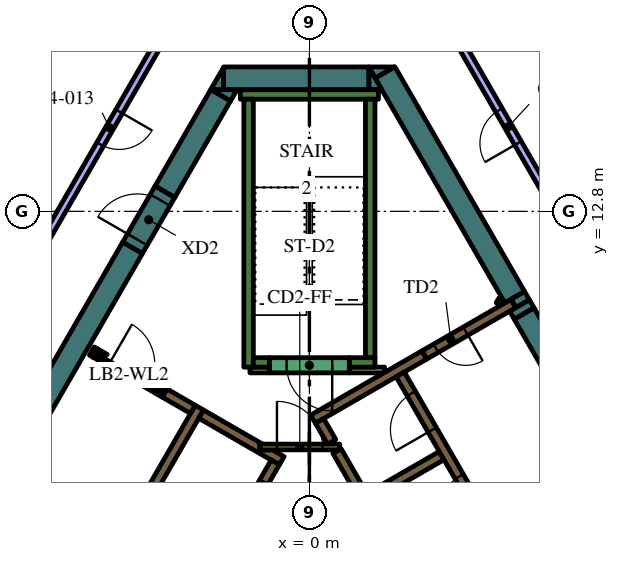
"""IFC4 building model, lengths in metres.
Left out: names, types, materials, properties, quantities, classifications, styles, units other than length and angle.
Written with IfcOpenShell. Run it as: python <this file> out.ifc"""

import sys

from ifc_helpers import new_model, si_unit, direction, frame, frame_2d, origin, place, context, subcontext, project, spatial, polyline, rectangle, outline, extrude, element, fill, save


model = new_model("IFC4")
c1 = context("Model", 3, precision=1e-05, world=origin(), true_north=direction((0.0, 1.0)))
c2 = subcontext(c1, "Body", "Model", "MODEL_VIEW")
j1 = project(units=[si_unit("LENGTHUNIT", "METRE"), si_unit("PLANEANGLEUNIT", "RADIAN")], contexts=[c1])
p1 = place(None, origin())
s1 = spatial("IfcSite", under=j1, at=p1, CompositionType="ELEMENT")
p2 = place(p1, origin())
s2 = spatial("IfcBuilding", under=s1, at=p2, CompositionType="ELEMENT")
p3 = place(p2, frame((0.0, 0.0, 304.8)))
s3 = spatial("IfcBuildingStorey", under=s2, at=p3, CompositionType="ELEMENT", Elevation=304.8)
p4 = place(p3, frame((5.529, 10.324, 0.0), z_axis=(0.0, 0.0, 1.0), x_axis=(0.499122205112, -0.866531606097, 0.0)))
e1 = element("IfcWall", 1, at=p4, inside=s3, PredefinedType="SOLIDWALL", context=c2, shape_type="SweptSolid", body=[
    extrude(rectangle(XDim=0.247, YDim=0.6, at=frame_2d((0.123, 0.0))), origin(), (0.0, 0.0, 1.0), 4.2),
])
p5 = place(p3, frame((1.989, 16.456, 0.0), z_axis=(0.0, 0.0, 1.0), x_axis=(0.499973159588, -0.866040899549, 0.0)))
e2 = element("IfcWall", 2, at=p5, inside=s3, PredefinedType="SOLIDWALL", context=c2, shape_type="SweptSolid", body=[
    extrude(rectangle(XDim=6.828, YDim=0.6, at=frame_2d((3.414, 0.0))), origin(), (0.0, 0.0, 1.0), 4.2),
])
p6 = place(p3, origin())
e3 = element("IfcWall", 3, at=p6, inside=s3, PredefinedType="SOLIDWALL", context=c2, shape_type="SweptSolid", body=[
    extrude(outline(polyline([(5.664, 10.691), (5.788, 10.476), (5.432, 10.271), (5.308, 10.486), (5.664, 10.691)])), origin(), (0.0, 0.0, 1.0), 4.2),
])
e4 = element("IfcWall", 4, at=p6, inside=s3, PredefinedType="SOLIDWALL", context=c2, shape_type="SweptSolid", body=[
    extrude(outline(polyline([(1.559, 16.6), (2.235, 16.6), (1.728, 16.307), (1.559, 16.6)])), origin(), (0.0, 0.0, 1.0), 4.2),
])
p7 = place(p3, frame((8.192, 5.711, 0.0), z_axis=(0.0, 0.0, 1.0), x_axis=(-0.500006836656, 0.866021456604, 0.0)))
e5 = element("IfcWall", 5, at=p7, inside=s3, PredefinedType="SOLIDWALL", context=c2, shape_type="SweptSolid", body=[
    extrude(rectangle(XDim=5.078, YDim=0.6, at=frame_2d((2.539, 0.0))), origin(), (0.0, 0.0, 1.0), 4.2),
])
p8 = place(p3, frame((-2.258, 16.3, 0.0), z_axis=(0.0, 0.0, 1.0), x_axis=(1.0, 0.0, 0.0)))
e6 = element("IfcWall", 6, at=p8, inside=s3, PredefinedType="SOLIDWALL", context=c2, shape_type="SweptSolid", body=[
    extrude(rectangle(XDim=3.823, YDim=0.6, at=frame_2d((1.912, 0.0))), origin(), (0.0, 0.0, 1.0), 4.2),
])
e7 = element("IfcWall", 7, at=p6, inside=s3, PredefinedType="SOLIDWALL", context=c2, shape_type="SweptSolid", body=[
    extrude(outline(polyline([(1.905, 16.0), (1.567, 16.0), (1.567, 16.585), (1.905, 16.0)])), origin(), (0.0, 0.0, 1.0), 4.2),
])
e8 = element("IfcWall", 8, at=p6, inside=s3, PredefinedType="SOLIDWALL", context=c2, shape_type="SweptSolid", body=[
    extrude(outline(polyline([(-2.598, 16.0), (-2.26, 16.585), (-2.26, 16.0), (-2.598, 16.0)])), origin(), (0.0, 0.0, 1.0), 4.2),
])
p9 = place(p3, frame((-2.335, 15.855, 0.0), z_axis=(0.0, 0.0, 1.0), x_axis=(-0.499960127962, -0.866048422692, 0.0)))
e9 = element("IfcWall", 9, at=p9, inside=s3, PredefinedType="SOLIDWALL", context=c2, shape_type="SweptSolid", body=[
    extrude(rectangle(XDim=2.934, YDim=0.6, at=frame_2d((1.467, 0.0))), origin(), (0.0, 0.0, 1.0), 4.2),
])
e10 = element("IfcWall", 10, at=p6, inside=s3, PredefinedType="SOLIDWALL", context=c2, shape_type="SweptSolid", body=[
    extrude(outline(polyline([(-1.905, 16.0), (-2.074, 15.707), (-2.581, 16.0), (-1.905, 16.0)])), origin(), (0.0, 0.0, 1.0), 4.2),
])
p10 = place(p3, frame((-12.582, -1.892, 0.0), z_axis=(0.0, 0.0, 1.0), x_axis=(0.500003640647, 0.866023301845, 0.0)))
e11 = element("IfcWall", 11, at=p10, inside=s3, PredefinedType="SOLIDWALL", context=c2, shape_type="SweptSolid", body=[
    extrude(rectangle(XDim=15.858, YDim=0.6, at=frame_2d((7.929, 0.0))), origin(), (0.0, 0.0, 1.0), 4.2),
])
p11 = place(p3, frame((-1.817, 15.875, 0.0), z_axis=(0.0, 0.0, 1.0), x_axis=(1.0, 0.0, 0.0)))
e12 = element("IfcWall", 12, at=p11, inside=s3, PredefinedType="SOLIDWALL", context=c2, shape_type="SweptSolid", body=[
    extrude(rectangle(XDim=3.634, YDim=0.25, at=frame_2d((1.817, 0.0))), origin(), (0.0, 0.0, 1.0), 4.2),
])
p12 = place(p3, frame((1.6, 8.95, 0.0), z_axis=(0.0, 0.0, 1.0), x_axis=(0.0, 1.0, 0.0)))
e13 = element("IfcWall", 13, at=p12, inside=s3, PredefinedType="SOLIDWALL", context=c2, shape_type="SweptSolid", body=[
    extrude(rectangle(XDim=6.8, YDim=0.25, at=frame_2d((3.4, 0.0))), origin(), (0.0, 0.0, 1.0), 4.2),
])
p13 = place(p3, frame((1.05, 8.825, 0.0), z_axis=(0.0, 0.0, 1.0), x_axis=(1.0, 0.0, 0.0)))
e14 = element("IfcWall", 14, at=p13, inside=s3, PredefinedType="SOLIDWALL", context=c2, shape_type="SweptSolid", body=[
    extrude(rectangle(XDim=0.675, YDim=0.25, at=frame_2d((0.337, 0.0))), origin(), (0.0, 0.0, 1.0), 4.2),
])
p14 = place(p3, frame((-1.6, 8.7, 0.0), z_axis=(0.0, 0.0, 1.0), x_axis=(0.0, 1.0, 0.0)))
e15 = element("IfcWall", 15, at=p14, inside=s3, PredefinedType="SOLIDWALL", context=c2, shape_type="SweptSolid", body=[
    extrude(rectangle(XDim=7.05, YDim=0.25, at=frame_2d((3.525, 0.0))), origin(), (0.0, 0.0, 1.0), 4.2),
])
p15 = place(p3, frame((-1.475, 8.825, 0.0), z_axis=(0.0, 0.0, 1.0), x_axis=(1.0, 0.0, 0.0)))
e16 = element("IfcWall", 16, at=p15, inside=s3, PredefinedType="SOLIDWALL", context=c2, shape_type="SweptSolid", body=[
    extrude(rectangle(XDim=0.425, YDim=0.25, at=frame_2d((0.212, 0.0))), origin(), (0.0, 0.0, 1.0), 4.2),
])
p16 = place(p3, frame((3.028, 9.023, 0.0), z_axis=(0.0, 0.0, 1.0), x_axis=(-0.866036587186, -0.49998062928, 0.0)))
e17 = element("IfcWall", 17, at=p16, inside=s3, PredefinedType="SOLIDWALL", context=c2, shape_type="SweptSolid", body=[
    extrude(rectangle(XDim=3.384, YDim=0.25, at=frame_2d((1.692, 0.0))), origin(), (0.0, 0.0, 1.0), 4.2),
])
p17 = place(p3, frame((0.268, 7.285, 0.0), z_axis=(0.0, 0.0, 1.0), x_axis=(0.500098681536, -0.865968422476, 0.0)))
e18 = element("IfcWall", 18, at=p17, inside=s3, PredefinedType="SOLIDWALL", context=c2, shape_type="SweptSolid", body=[
    extrude(rectangle(XDim=0.636, YDim=0.25, at=frame_2d((0.318, 0.0))), origin(), (0.0, 0.0, 1.0), 4.2),
])
p18 = place(p3, frame((5.97, -2.591, 0.0), z_axis=(0.0, 0.0, 1.0), x_axis=(-0.499994469932, 0.866028596547, 0.0)))
e19 = element("IfcWall", 19, at=p18, inside=s3, PredefinedType="SOLIDWALL", context=c2, shape_type="SweptSolid", body=[
    extrude(rectangle(XDim=10.488, YDim=0.25, at=frame_2d((5.244, 0.0))), origin(), (0.0, 0.0, 1.0), 4.2),
])
p19 = place(p3, frame((1.574, 5.274, 0.0), z_axis=(0.0, 0.0, 1.0), x_axis=(0.866028486751, 0.499994660107, 0.0)))
e20 = element("IfcWall", 20, at=p19, inside=s3, PredefinedType="SOLIDWALL", context=c2, shape_type="SweptSolid", body=[
    extrude(rectangle(XDim=2.2, YDim=0.25, at=frame_2d((1.1, 0.0))), origin(), (0.0, 0.0, 1.0), 4.2),
])
p20 = place(p3, frame((-8.06, -1.311, 0.0), z_axis=(0.0, 0.0, 1.0), x_axis=(0.50000273126, 0.866023826885, 0.0)))
e21 = element("IfcWall", 21, at=p20, inside=s3, PredefinedType="SOLIDWALL", context=c2, shape_type="SweptSolid", body=[
    extrude(rectangle(XDim=10.33, YDim=0.25, at=frame_2d((5.165, 0.0))), origin(), (0.0, 0.0, 1.0), 4.2),
])
e22 = element("IfcWall", 22, at=p6, inside=s3, PredefinedType="SOLIDWALL", context=c2, shape_type="SweptSolid", body=[
    extrude(outline(polyline([(-2.912, 7.356), (-2.787, 7.573), (-1.232, 6.675), (-1.303, 6.675), (-1.304, 6.675), (-1.304, 6.675), (-1.304, 6.525), (-1.304, 6.525), (-1.303, 6.525), (-0.971, 6.525), (-0.665, 6.348), (-0.79, 6.132), (-1.007, 6.257), (-1.007, 6.257), (-2.912, 7.356)])), origin(), (0.0, 0.0, 1.0), 4.2),
])
p21 = place(p3, frame((-5.725, 9.125, 0.0), z_axis=(0.0, 0.0, 1.0), x_axis=(0.866185586049, -0.49972245349, 0.0)))
e23 = element("IfcWall", 23, at=p21, inside=s3, PredefinedType="SOLIDWALL", context=c2, shape_type="SweptSolid", body=[
    extrude(rectangle(XDim=0.11, YDim=0.25, at=frame_2d((0.055, 0.0))), origin(), (0.0, 0.0, 1.0), 4.2),
])
p22 = place(p3, frame((-3.066, 7.59, 0.0), z_axis=(0.0, 0.0, 1.0), x_axis=(-0.866081358704, 0.49990307071, 0.0)))
e24 = element("IfcWall", 24, at=p22, inside=s3, PredefinedType="SOLIDWALL", context=c2, shape_type="SweptSolid", body=[
    extrude(rectangle(XDim=0.858, YDim=0.25, at=frame_2d((0.429, 0.0))), origin(), (0.0, 0.0, 1.0), 4.2),
])
e25 = element("IfcWall", 25, at=p6, inside=s3, PredefinedType="SOLIDWALL", context=c2, shape_type="SweptSolid", body=[
    extrude(outline(polyline([(-3.748, 8.128), (-3.813, 8.015), (-4.027, 8.139), (-4.017, 8.156), (-4.008, 8.173), (-4.0, 8.192), (-3.995, 8.21), (-3.991, 8.23), (-3.99, 8.25), (-3.99, 8.268), (-3.748, 8.128)])), origin(), (0.0, 0.0, 1.0), 4.2),
])
e26 = element("IfcWall", 26, at=p6, inside=s3, PredefinedType="SOLIDWALL", context=c2, shape_type="SweptSolid", body=[
    extrude(outline(polyline([(-5.689, 8.96), (-5.69, 8.961), (-5.565, 9.177), (-5.319, 9.035), (-5.335, 9.026), (-5.351, 9.015), (-5.366, 9.002), (-5.379, 8.988), (-5.392, 8.972), (-5.402, 8.956), (-5.412, 8.939), (-5.629, 9.064), (-5.629, 9.064), (-5.689, 8.96)])), origin(), (0.0, 0.0, 1.0), 4.2),
])
p23 = place(p3, frame((1.05, 8.625, 0.0), z_axis=(0.0, 0.0, 1.0), x_axis=(1.0, 0.0, 0.0)))
e27 = element("IfcWall", 27, at=p23, inside=s3, PredefinedType="PARTITIONING", context=c2, shape_type="SweptSolid", body=[
    extrude(rectangle(XDim=0.929, YDim=0.15, at=frame_2d((0.464, 0.0))), origin(), (0.0, 0.0, 1.0), 3.55),
])
p24 = place(p3, frame((-1.564, 8.625, 0.0), z_axis=(0.0, 0.0, 1.0), x_axis=(1.0, 0.0, 0.0)))
e28 = element("IfcWall", 28, at=p24, inside=s3, PredefinedType="PARTITIONING", context=c2, shape_type="SweptSolid", body=[
    extrude(rectangle(XDim=0.514, YDim=0.15, at=frame_2d((0.257, 0.0))), origin(), (0.0, 0.0, 1.0), 3.55),
])
p25 = place(p3, frame((4.98, 10.358, 0.0), z_axis=(0.0, 0.0, 1.0), x_axis=(0.500640202437, 0.86565546709, 0.0)))
e29 = element("IfcWall", 29, at=p25, inside=s3, PredefinedType="PARTITIONING", context=c2, shape_type="SweptSolid", body=[
    extrude(rectangle(XDim=0.146, YDim=0.15, at=frame_2d((0.073, 0.0))), origin(), (0.0, 0.0, 1.0), 3.55),
])
p26 = place(p3, frame((8.565, -2.185, 0.0), z_axis=(0.0, 0.0, 1.0), x_axis=(-0.499997954832, 0.866026584559, 0.0)))
e30 = element("IfcWall", 30, at=p26, inside=s3, PredefinedType="SOLIDWALL", context=c2, shape_type="SweptSolid", body=[
    extrude(rectangle(XDim=12.35, YDim=0.25, at=frame_2d((6.175, 0.0))), origin(), (0.0, 0.0, 1.0), 4.2),
])
p27 = place(p26, frame((0.685, 0.0, 0.0)))
e31 = element("IfcOpeningElement", 31, at=p27, cuts=e30, PredefinedType="OPENING", context=c2, shape_type="SweptSolid", body=[
    extrude(rectangle(XDim=0.9, YDim=2.1, at=frame_2d((0.45, 1.05))), frame((0.0, 0.135, 0.0), z_axis=(0.0, -1.0, 0.0), x_axis=(1.0, 0.0, 0.0)), (0.0, 0.0, 1.0), 0.27),
])
p28 = place(p26, frame((3.105, 0.0, 0.0)))
e32 = element("IfcOpeningElement", 32, at=p28, cuts=e30, PredefinedType="OPENING", context=c2, shape_type="SweptSolid", body=[
    extrude(rectangle(XDim=1.1, YDim=2.1, at=frame_2d((0.55, 1.05))), frame((0.0, 0.135, 0.0), z_axis=(0.0, -1.0, 0.0), x_axis=(1.0, 0.0, 0.0)), (0.0, 0.0, 1.0), 0.27),
])
p29 = place(p26, frame((5.625, 0.0, 0.0)))
e33 = element("IfcOpeningElement", 33, at=p29, cuts=e30, PredefinedType="OPENING", context=c2, shape_type="SweptSolid", body=[
    extrude(rectangle(XDim=1.1, YDim=2.1, at=frame_2d((0.55, 1.05))), frame((0.0, 0.135, 0.0), z_axis=(0.0, -1.0, 0.0), x_axis=(1.0, 0.0, 0.0)), (0.0, 0.0, 1.0), 0.27),
])
p30 = place(p26, frame((8.145, 0.0, 0.0)))
e34 = element("IfcOpeningElement", 34, at=p30, cuts=e30, PredefinedType="OPENING", context=c2, shape_type="SweptSolid", body=[
    extrude(rectangle(XDim=1.1, YDim=2.1, at=frame_2d((0.55, 1.05))), frame((0.0, 0.135, 0.0), z_axis=(0.0, -1.0, 0.0), x_axis=(1.0, 0.0, 0.0)), (0.0, 0.0, 1.0), 0.27),
])
p31 = place(p26, frame((10.665, 0.0, 0.0)))
e35 = element("IfcOpeningElement", 35, at=p31, cuts=e30, PredefinedType="OPENING", context=c2, shape_type="SweptSolid", body=[
    extrude(rectangle(XDim=1.1, YDim=2.1, at=frame_2d((0.55, 1.05))), frame((0.0, 0.135, 0.0), z_axis=(0.0, -1.0, 0.0), x_axis=(1.0, 0.0, 0.0)), (0.0, 0.0, 1.0), 0.27),
])
p32 = place(p3, frame((-0.898, 6.194, 0.0), z_axis=(0.0, 0.0, 1.0), x_axis=(-0.499996202215, -0.866027596426, 0.0)))
e36 = element("IfcWall", 36, at=p32, inside=s3, PredefinedType="SOLIDWALL", context=c2, shape_type="SweptSolid", body=[
    extrude(rectangle(XDim=9.83, YDim=0.25, at=frame_2d((4.915, 0.0))), origin(), (0.0, 0.0, 1.0), 4.2),
])
p33 = place(p32, frame((0.585, 0.0, 0.0)))
e37 = element("IfcOpeningElement", 37, at=p33, cuts=e36, PredefinedType="OPENING", context=c2, shape_type="SweptSolid", body=[
    extrude(rectangle(XDim=1.1, YDim=2.1, at=frame_2d((0.55, 1.05))), frame((0.0, 0.135, 0.0), z_axis=(0.0, -1.0, 0.0), x_axis=(1.0, 0.0, 0.0)), (0.0, 0.0, 1.0), 0.27),
])
p34 = place(p32, frame((3.105, 0.0, 0.0)))
e38 = element("IfcOpeningElement", 38, at=p34, cuts=e36, PredefinedType="OPENING", context=c2, shape_type="SweptSolid", body=[
    extrude(rectangle(XDim=1.1, YDim=2.1, at=frame_2d((0.55, 1.05))), frame((0.0, 0.135, 0.0), z_axis=(0.0, -1.0, 0.0), x_axis=(1.0, 0.0, 0.0)), (0.0, 0.0, 1.0), 0.27),
])
p35 = place(p32, frame((5.625, 0.0, 0.0)))
e39 = element("IfcOpeningElement", 39, at=p35, cuts=e36, PredefinedType="OPENING", context=c2, shape_type="SweptSolid", body=[
    extrude(rectangle(XDim=1.1, YDim=2.1, at=frame_2d((0.55, 1.05))), frame((0.0, 0.135, 0.0), z_axis=(0.0, -1.0, 0.0), x_axis=(1.0, 0.0, 0.0)), (0.0, 0.0, 1.0), 0.27),
])
p36 = place(p32, frame((8.145, 0.0, 0.0)))
e40 = element("IfcOpeningElement", 40, at=p36, cuts=e36, PredefinedType="OPENING", context=c2, shape_type="SweptSolid", body=[
    extrude(rectangle(XDim=1.1, YDim=2.1, at=frame_2d((0.55, 1.05))), frame((0.0, 0.135, 0.0), z_axis=(0.0, -1.0, 0.0), x_axis=(1.0, 0.0, 0.0)), (0.0, 0.0, 1.0), 0.27),
])
p37 = place(p3, frame((1.05, 8.75, 0.0), z_axis=(0.0, 0.0, 1.0), x_axis=(-1.0, 0.0, 0.0)))
e41 = element("IfcWall", 41, at=p37, inside=s3, PredefinedType="SOLIDWALL", context=c2, shape_type="SweptSolid", body=[
    extrude(rectangle(XDim=2.1, YDim=0.4, at=frame_2d((1.05, 0.0))), origin(), (0.0, 0.0, 1.0), 4.2),
])
p38 = place(p37, frame((0.45, 0.0, 0.0)))
e42 = element("IfcOpeningElement", 42, at=p38, cuts=e41, PredefinedType="OPENING", context=c2, shape_type="SweptSolid", body=[
    extrude(rectangle(XDim=1.2, YDim=2.1, at=frame_2d((0.6, 1.05))), frame((0.0, 0.21, 0.0), z_axis=(0.0, -1.0, 0.0), x_axis=(1.0, 0.0, 0.0)), (0.0, 0.0, 1.0), 0.42),
])
p39 = place(p3, frame((5.366, 10.373, 0.0), z_axis=(0.0, 0.0, 1.0), x_axis=(-0.866019956843, -0.50000943426, 0.0)))
e43 = element("IfcWall", 43, at=p39, inside=s3, PredefinedType="SOLIDWALL", context=c2, shape_type="SweptSolid", body=[
    extrude(rectangle(XDim=2.7, YDim=0.25, at=frame_2d((1.35, 0.0))), origin(), (0.0, 0.0, 1.0), 4.2),
])
p40 = place(p39, frame((1.45, 0.0, 0.0)))
e44 = element("IfcOpeningElement", 44, at=p40, cuts=e43, PredefinedType="OPENING", context=c2, shape_type="SweptSolid", body=[
    extrude(rectangle(XDim=0.9, YDim=2.1, at=frame_2d((0.45, 1.05))), frame((0.0, 0.135, 0.0), z_axis=(0.0, -1.0, 0.0), x_axis=(1.0, 0.0, 0.0)), (0.0, 0.0, 1.0), 0.27),
])
p41 = place(p3, frame((-1.303, 6.6, 0.0), z_axis=(0.0, 0.0, 1.0), x_axis=(1.0, 0.0, 0.0)))
e45 = element("IfcWall", 45, at=p41, inside=s3, PredefinedType="PARTITIONING", context=c2, shape_type="SweptSolid", body=[
    extrude(rectangle(XDim=2.1, YDim=0.15, at=frame_2d((1.05, 0.0))), origin(), (0.0, 0.0, 1.0), 4.2),
])
p42 = place(p41, frame((0.45, 0.0, 0.0)))
e46 = element("IfcOpeningElement", 46, at=p42, cuts=e45, PredefinedType="OPENING", context=c2, shape_type="SweptSolid", body=[
    extrude(rectangle(XDim=1.2, YDim=2.1, at=frame_2d((0.6, 1.05))), frame((0.0, 0.085, 0.0), z_axis=(0.0, -1.0, 0.0), x_axis=(1.0, 0.0, 0.0)), (0.0, 0.0, 1.0), 0.17),
])
p43 = place(p3, frame((-5.659, 9.012, 0.0), z_axis=(0.0, 0.0, 1.0), x_axis=(0.866009402589, -0.500027713859, 0.0)))
e47 = element("IfcWall", 47, at=p43, inside=s3, PredefinedType="PARTITIONING", context=c2, shape_type="SweptSolid", body=[
    extrude(rectangle(XDim=2.1, YDim=0.12, at=frame_2d((1.05, 0.0))), origin(), (0.0, 0.0, 1.0), 3.55),
])
p44 = place(p43, frame((0.45, 0.0, 0.0)))
e48 = element("IfcOpeningElement", 48, at=p44, cuts=e47, PredefinedType="OPENING", context=c2, shape_type="SweptSolid", body=[
    extrude(rectangle(XDim=1.2, YDim=2.1, at=frame_2d((0.6, 1.05))), frame((0.0, 0.07, 0.0), z_axis=(0.0, -1.0, 0.0), x_axis=(1.0, 0.0, 0.0)), (0.0, 0.0, 1.0), 0.14),
])
p45 = place(p3, frame((-4.652, 11.842, 0.0), z_axis=(0.0, 0.0, 1.0), x_axis=(0.500062241894, 0.865989465428, 0.0)))
e49 = element("IfcWall", 49, at=p45, inside=s3, PredefinedType="SOLIDWALL", context=c2, shape_type="SweptSolid", body=[
    extrude(rectangle(XDim=1.7, YDim=0.6, at=frame_2d((0.85, 0.0))), origin(), (0.0, 0.0, 1.0), 4.2),
])
p46 = place(p45, frame((0.25, 0.0, 0.0)))
e50 = element("IfcOpeningElement", 50, at=p46, cuts=e49, PredefinedType="OPENING", context=c2, shape_type="SweptSolid", body=[
    extrude(rectangle(XDim=1.2, YDim=2.1, at=frame_2d((0.6, 1.05))), frame((0.0, 0.31, 0.0), z_axis=(0.0, -1.0, 0.0), x_axis=(1.0, 0.0, 0.0)), (0.0, 0.0, 1.0), 0.62),
])
p47 = place(p3, frame((7.188, 11.65, 0.0), z_axis=(0.0, 0.0, 1.0), x_axis=(-0.499986368499, 0.866033273792, 0.0)))
e51 = element("IfcWall", 51, at=p47, inside=s3, PredefinedType="PARTITIONING", context=c2, shape_type="SweptSolid", body=[
    extrude(rectangle(XDim=7.794, YDim=0.2, at=frame_2d((3.897, 0.0))), origin(), (0.0, 0.0, 1.0), 3.55),
])
p48 = place(p47, frame((3.4, 0.0, 0.0)))
e52 = element("IfcOpeningElement", 52, at=p48, cuts=e51, PredefinedType="OPENING", context=c2, shape_type="SweptSolid", body=[
    extrude(rectangle(XDim=1.0, YDim=2.1, at=frame_2d((0.5, 1.05))), frame((0.0, 0.11, 0.0), z_axis=(0.0, -1.0, 0.0), x_axis=(1.0, 0.0, 0.0)), (0.0, 0.0, 1.0), 0.22),
])
p49 = place(p3, frame((-8.544, 15.69, 0.0), z_axis=(0.0, 0.0, 1.0), x_axis=(0.599538824769, 0.800345673815, 0.0)))
e53 = element("IfcWall", 53, at=p49, inside=s3, PredefinedType="PARTITIONING", context=c2, shape_type="SweptSolid", body=[
    extrude(rectangle(XDim=3.474, YDim=0.15, at=frame_2d((1.737, 0.0))), origin(), (0.0, 0.0, 1.0), 3.55),
])
p50 = place(p49, frame((1.274, 0.0, 0.0)))
e54 = element("IfcOpeningElement", 54, at=p50, cuts=e53, PredefinedType="OPENING", context=c2, shape_type="SweptSolid", body=[
    extrude(rectangle(XDim=0.9, YDim=2.1, at=frame_2d((0.45, 1.05))), frame((0.0, 0.085, 0.0), z_axis=(0.0, -1.0, 0.0), x_axis=(1.0, 0.0, 0.0)), (0.0, 0.0, 1.0), 0.17),
])
p51 = place(p3, frame((-3.306, 18.374, 0.0), z_axis=(0.0, 0.0, 1.0), x_axis=(-0.500000072396, -0.866025361987, 0.0)))
e55 = element("IfcWall", 55, at=p51, inside=s3, PredefinedType="PARTITIONING", context=c2, shape_type="SweptSolid", body=[
    extrude(rectangle(XDim=7.739, YDim=0.2, at=frame_2d((3.87, 0.0))), origin(), (0.0, 0.0, 1.0), 3.55),
])
p52 = place(p51, frame((3.4, 0.0, 0.0)))
e56 = element("IfcOpeningElement", 56, at=p52, cuts=e55, PredefinedType="OPENING", context=c2, shape_type="SweptSolid", body=[
    extrude(rectangle(XDim=1.0, YDim=2.1, at=frame_2d((0.5, 1.05))), frame((0.0, 0.11, 0.0), z_axis=(0.0, -1.0, 0.0), x_axis=(1.0, 0.0, 0.0)), (0.0, 0.0, 1.0), 0.22),
])
p53 = place(p30, origin())
e57 = element("IfcDoor", 57, at=p53, inside=s3, OperationType="DOUBLE_DOOR_SLIDING", PredefinedType="DOOR", context=c2, shape_type="SweptSolid", body=[
    extrude(rectangle(XDim=1.1, YDim=2.1, at=frame_2d((0.55, 1.05))), frame((0.0, 0.025, 0.0), z_axis=(0.0, -1.0, 0.0), x_axis=(1.0, 0.0, 0.0)), (0.0, 0.0, 1.0), 0.05),
])
fill(e34, e57)
p54 = place(p31, origin())
e58 = element("IfcDoor", 58, at=p54, inside=s3, OperationType="DOUBLE_DOOR_SLIDING", PredefinedType="DOOR", context=c2, shape_type="SweptSolid", body=[
    extrude(rectangle(XDim=1.1, YDim=2.1, at=frame_2d((0.55, 1.05))), frame((0.0, 0.025, 0.0), z_axis=(0.0, -1.0, 0.0), x_axis=(1.0, 0.0, 0.0)), (0.0, 0.0, 1.0), 0.05),
])
fill(e35, e58)
p55 = place(p33, origin())
e59 = element("IfcDoor", 59, at=p55, inside=s3, OperationType="DOUBLE_DOOR_SLIDING", PredefinedType="DOOR", context=c2, shape_type="SweptSolid", body=[
    extrude(rectangle(XDim=1.1, YDim=2.1, at=frame_2d((0.55, 1.05))), frame((0.0, 0.025, 0.0), z_axis=(0.0, -1.0, 0.0), x_axis=(1.0, 0.0, 0.0)), (0.0, 0.0, 1.0), 0.05),
])
fill(e37, e59)
p56 = place(p38, origin())
e60 = element("IfcDoor", 60, at=p56, inside=s3, OperationType="SINGLE_SWING_LEFT", PredefinedType="DOOR", context=c2, shape_type="SweptSolid", body=[
    extrude(rectangle(XDim=1.2, YDim=2.1, at=frame_2d((0.6, 1.05))), frame((0.0, 0.025, 0.0), z_axis=(0.0, -1.0, 0.0), x_axis=(1.0, 0.0, 0.0)), (0.0, 0.0, 1.0), 0.05),
])
fill(e42, e60)
p57 = place(p40, origin())
e61 = element("IfcDoor", 61, at=p57, inside=s3, OperationType="SINGLE_SWING_LEFT", PredefinedType="DOOR", context=c2, shape_type="SweptSolid", body=[
    extrude(rectangle(XDim=0.9, YDim=2.1, at=frame_2d((0.45, 1.05))), frame((0.0, 0.025, 0.0), z_axis=(0.0, -1.0, 0.0), x_axis=(1.0, 0.0, 0.0)), (0.0, 0.0, 1.0), 0.05),
])
fill(e44, e61)
p58 = place(p42, origin())
e62 = element("IfcDoor", 62, at=p58, inside=s3, OperationType="SINGLE_SWING_LEFT", PredefinedType="DOOR", context=c2, shape_type="SweptSolid", body=[
    extrude(rectangle(XDim=1.2, YDim=2.1, at=frame_2d((0.6, 1.05))), frame((0.0, 0.025, 0.0), z_axis=(0.0, -1.0, 0.0), x_axis=(1.0, 0.0, 0.0)), (0.0, 0.0, 1.0), 0.05),
])
fill(e46, e62)
p59 = place(p44, origin())
e63 = element("IfcDoor", 63, at=p59, inside=s3, OperationType="SINGLE_SWING_LEFT", PredefinedType="DOOR", context=c2, shape_type="SweptSolid", body=[
    extrude(rectangle(XDim=1.2, YDim=2.1, at=frame_2d((0.6, 1.05))), frame((0.0, 0.025, 0.0), z_axis=(0.0, -1.0, 0.0), x_axis=(1.0, 0.0, 0.0)), (0.0, 0.0, 1.0), 0.05),
])
fill(e48, e63)
p60 = place(p46, origin())
e64 = element("IfcDoor", 64, at=p60, inside=s3, OperationType="SINGLE_SWING_LEFT", PredefinedType="DOOR", context=c2, shape_type="SweptSolid", body=[
    extrude(rectangle(XDim=1.2, YDim=2.1, at=frame_2d((0.6, 1.05))), frame((0.0, 0.025, 0.0), z_axis=(0.0, -1.0, 0.0), x_axis=(1.0, 0.0, 0.0)), (0.0, 0.0, 1.0), 0.05),
])
fill(e50, e64)
p61 = place(p48, origin())
e65 = element("IfcDoor", 65, at=p61, inside=s3, OperationType="SINGLE_SWING_RIGHT", PredefinedType="DOOR", context=c2, shape_type="SweptSolid", body=[
    extrude(rectangle(XDim=1.0, YDim=2.1, at=frame_2d((0.5, 1.05))), frame((0.0, 0.025, 0.0), z_axis=(0.0, -1.0, 0.0), x_axis=(1.0, 0.0, 0.0)), (0.0, 0.0, 1.0), 0.05),
])
fill(e52, e65)
p62 = place(p52, origin())
e66 = element("IfcDoor", 66, at=p62, inside=s3, OperationType="SINGLE_SWING_RIGHT", PredefinedType="DOOR", context=c2, shape_type="SweptSolid", body=[
    extrude(rectangle(XDim=1.0, YDim=2.1, at=frame_2d((0.5, 1.05))), frame((0.0, 0.025, 0.0), z_axis=(0.0, -1.0, 0.0), x_axis=(1.0, 0.0, 0.0)), (0.0, 0.0, 1.0), 0.05),
])
fill(e56, e66)
save(model, sys.argv[1])
